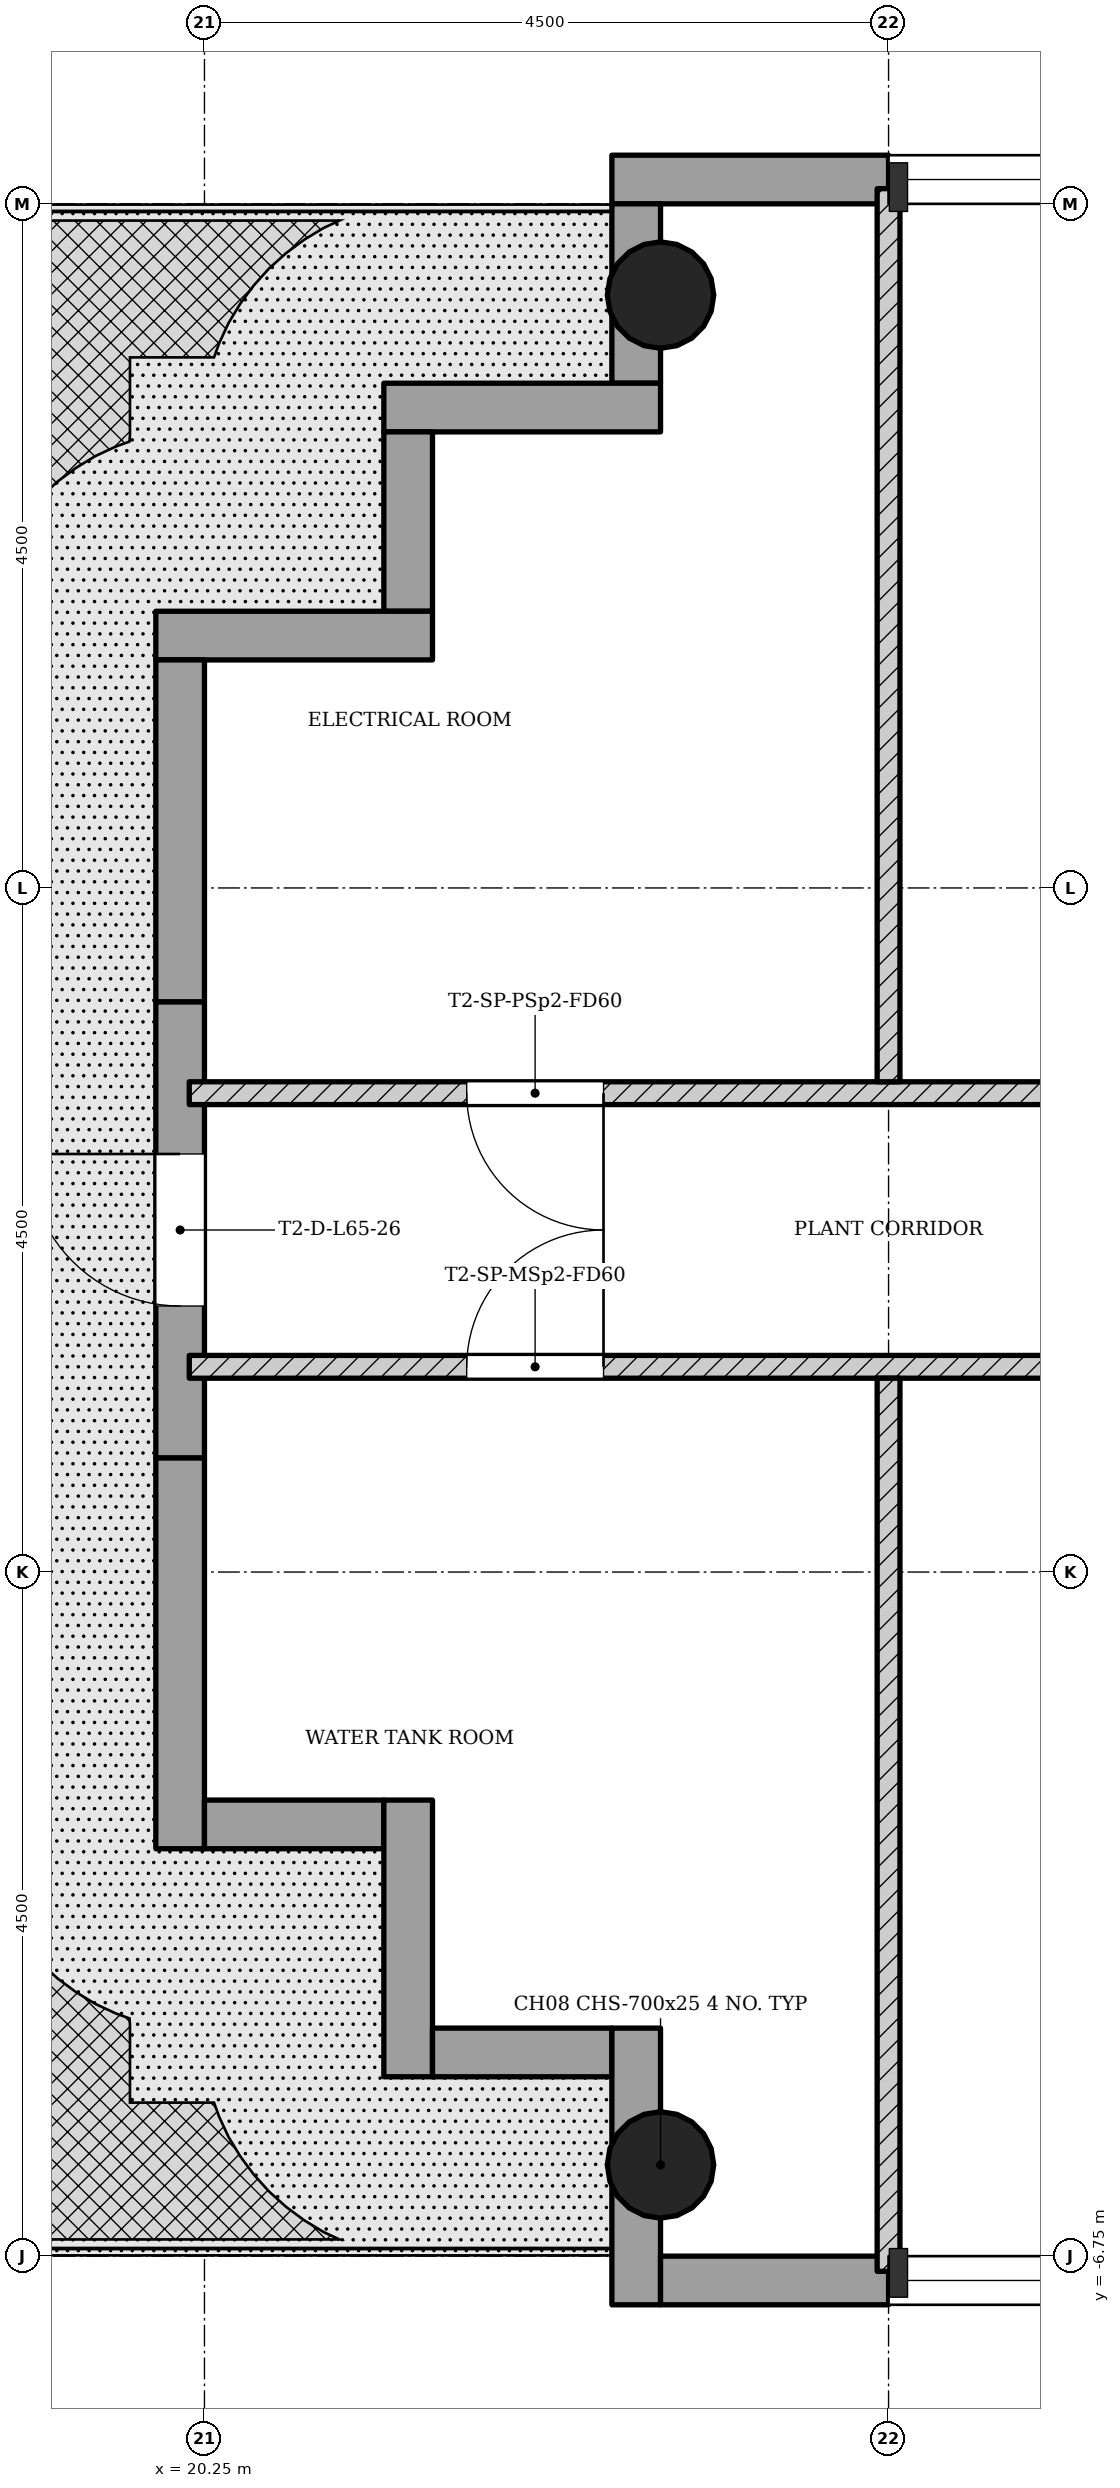
"""IFC4 building model, lengths in metres.
Left out: names, types, materials, properties, quantities, classifications, styles, units other than length and angle.
Written with IfcOpenShell. Run it as: python <this file> out.ifc"""

import sys

from ifc_helpers import new_model, si_unit, direction, frame, frame_2d, origin, origin_2d, place, context, subcontext, project, spatial, rectangle, hollow_circle, extrude, element, fill, save


model = new_model("IFC4")
c1 = context("Model", 3, precision=1e-05, world=origin(), true_north=direction((0.0, 1.0)))
c2 = subcontext(c1, "Body", "Model", "MODEL_VIEW")
j1 = project(units=[si_unit("LENGTHUNIT", "METRE"), si_unit("PLANEANGLEUNIT", "RADIAN")], contexts=[c1])
p1 = place(None, origin())
s1 = spatial("IfcSite", under=j1, at=p1, CompositionType="ELEMENT")
p2 = place(p1, origin())
s2 = spatial("IfcBuilding", under=s1, at=p2, CompositionType="ELEMENT")
p3 = place(p2, frame((0.0, 0.0, 233.4)))
s3 = spatial("IfcBuildingStorey", under=s2, at=p3, CompositionType="ELEMENT", Elevation=233.4)
for number, where, z_axis, x_axis in (
    (1, (23.25, 6.15, 0.0), (0.0, 0.0, 1.0), (1.0, 0.0, 0.0)),
    (2, (23.25, -6.15, 0.0), (0.0, 0.0, 1.0), (1.0, 0.0, 0.0)),
):
    element("IfcColumn", number, at=place(p3, frame(where, z_axis=z_axis, x_axis=x_axis)), inside=s3, PredefinedType="COLUMN", context=c2, shape_type="SweptSolid", body=[
        extrude(hollow_circle(Radius=0.35, WallThickness=0.025, at=origin_2d()), origin(), (0.0, 0.0, 1.0), 4.5),
    ])
p4 = place(p3, frame((24.75, 6.91, 0.0), z_axis=(0.0, 0.0, 1.0), x_axis=(-1.0, 0.0, 0.0)))
e3 = element("IfcWall", 3, at=p4, inside=s3, PredefinedType="STANDARD", context=c2, shape_type="SweptSolid", body=[
    extrude(rectangle(XDim=1.82, YDim=0.32, at=frame_2d((0.91, 0.0))), origin(), (0.0, 0.0, 1.0), 4.2),
])
p5 = place(p3, frame((23.09, 6.75, -0.02), z_axis=(0.0, 0.0, 1.0), x_axis=(0.0, -1.0, 0.0)))
e4 = element("IfcWall", 4, at=p5, inside=s3, PredefinedType="STANDARD", context=c2, shape_type="SweptSolid", body=[
    extrude(rectangle(XDim=1.18, YDim=0.32, at=frame_2d((0.59, 0.0))), origin(), (0.0, 0.0, 1.0), 4.22),
])
p6 = place(p3, frame((23.25, 5.41, -0.02), z_axis=(0.0, 0.0, 1.0), x_axis=(-1.0, 0.0, 0.0)))
e5 = element("IfcWall", 5, at=p6, inside=s3, PredefinedType="STANDARD", context=c2, shape_type="SweptSolid", body=[
    extrude(rectangle(XDim=1.82, YDim=0.32, at=frame_2d((0.91, 0.0))), origin(), (0.0, 0.0, 1.0), 4.22),
])
p7 = place(p3, frame((21.59, 5.25, -0.02), z_axis=(0.0, 0.0, 1.0), x_axis=(0.0, -1.0, 0.0)))
e6 = element("IfcWall", 6, at=p7, inside=s3, PredefinedType="STANDARD", context=c2, shape_type="SweptSolid", body=[
    extrude(rectangle(XDim=1.18, YDim=0.32, at=frame_2d((0.59, 0.0))), origin(), (0.0, 0.0, 1.0), 4.22),
])
p8 = place(p3, frame((21.75, 3.91, -0.02), z_axis=(0.0, 0.0, 1.0), x_axis=(-1.0, 0.0, 0.0)))
e7 = element("IfcWall", 7, at=p8, inside=s3, PredefinedType="STANDARD", context=c2, shape_type="SweptSolid", body=[
    extrude(rectangle(XDim=1.82, YDim=0.32, at=frame_2d((0.91, 0.0))), origin(), (0.0, 0.0, 1.0), 4.22),
])
p9 = place(p3, frame((20.09, 3.75, -0.02), z_axis=(0.0, 0.0, 1.0), x_axis=(0.0, -1.0, 0.0)))
e8 = element("IfcWall", 8, at=p9, inside=s3, PredefinedType="STANDARD", context=c2, shape_type="SweptSolid", body=[
    extrude(rectangle(XDim=2.25, YDim=0.32, at=frame_2d((1.125, 0.0))), origin(), (0.0, 0.0, 1.0), 4.22),
])
p10 = place(p3, frame((20.09, 1.5, -0.02), z_axis=(0.0, 0.0, 1.0), x_axis=(0.0, -1.0, 0.0)))
e9 = element("IfcWall", 9, at=p10, inside=s3, PredefinedType="STANDARD", context=c2, shape_type="SweptSolid", body=[
    extrude(rectangle(XDim=3.0, YDim=0.32, at=frame_2d((1.5, 0.0))), origin(), (0.0, 0.0, 1.0), 4.22),
])
p11 = place(p10, frame((1.0, 0.0, 0.02)))
e10 = element("IfcOpeningElement", 10, at=p11, cuts=e9, PredefinedType="OPENING", context=c2, shape_type="SweptSolid", body=[
    extrude(rectangle(XDim=1.0, YDim=2.1, at=frame_2d((0.5, 1.05))), frame((0.0, 0.17, 0.0), z_axis=(0.0, -1.0, 0.0), x_axis=(1.0, 0.0, 0.0)), (0.0, 0.0, 1.0), 0.34),
])
p12 = place(p3, frame((20.09, -1.5, -0.02), z_axis=(0.0, 0.0, 1.0), x_axis=(0.0, -1.0, 0.0)))
e11 = element("IfcWall", 11, at=p12, inside=s3, PredefinedType="STANDARD", context=c2, shape_type="SweptSolid", body=[
    extrude(rectangle(XDim=2.57, YDim=0.32, at=frame_2d((1.285, 0.0))), origin(), (0.0, 0.0, 1.0), 4.22),
])
p13 = place(p3, frame((20.25, -3.91, -0.02), z_axis=(0.0, 0.0, 1.0), x_axis=(1.0, 0.0, 0.0)))
e12 = element("IfcWall", 12, at=p13, inside=s3, PredefinedType="STANDARD", context=c2, shape_type="SweptSolid", body=[
    extrude(rectangle(XDim=1.18, YDim=0.32, at=frame_2d((0.59, 0.0))), origin(), (0.0, 0.0, 1.0), 4.22),
])
p14 = place(p3, frame((21.59, -3.75, -0.02), z_axis=(0.0, 0.0, 1.0), x_axis=(0.0, -1.0, 0.0)))
e13 = element("IfcWall", 13, at=p14, inside=s3, PredefinedType="STANDARD", context=c2, shape_type="SweptSolid", body=[
    extrude(rectangle(XDim=1.82, YDim=0.32, at=frame_2d((0.91, 0.0))), origin(), (0.0, 0.0, 1.0), 4.22),
])
p15 = place(p3, frame((21.75, -5.41, -0.02), z_axis=(0.0, 0.0, 1.0), x_axis=(1.0, 0.0, 0.0)))
e14 = element("IfcWall", 14, at=p15, inside=s3, PredefinedType="STANDARD", context=c2, shape_type="SweptSolid", body=[
    extrude(rectangle(XDim=1.18, YDim=0.32, at=frame_2d((0.59, 0.0))), origin(), (0.0, 0.0, 1.0), 4.22),
])
p16 = place(p3, frame((23.09, -5.25, -0.02), z_axis=(0.0, 0.0, 1.0), x_axis=(0.0, -1.0, 0.0)))
e15 = element("IfcWall", 15, at=p16, inside=s3, PredefinedType="STANDARD", context=c2, shape_type="SweptSolid", body=[
    extrude(rectangle(XDim=1.82, YDim=0.32, at=frame_2d((0.91, 0.0))), origin(), (0.0, 0.0, 1.0), 4.22),
])
p17 = place(p3, frame((23.25, -6.91, 0.0), z_axis=(0.0, 0.0, 1.0), x_axis=(1.0, 0.0, 0.0)))
e16 = element("IfcWall", 16, at=p17, inside=s3, PredefinedType="STANDARD", context=c2, shape_type="SweptSolid", body=[
    extrude(rectangle(XDim=1.5, YDim=0.32, at=frame_2d((0.75, 0.0))), origin(), (0.0, 0.0, 1.0), 4.2),
])
p18 = place(p3, frame((29.175, 0.9, 0.0), z_axis=(0.0, 0.0, 1.0), x_axis=(-1.0, 0.0, 0.0)))
e17 = element("IfcWall", 17, at=p18, inside=s3, PredefinedType="PARTITIONING", context=c2, shape_type="SweptSolid", body=[
    extrude(rectangle(XDim=9.025, YDim=0.15, at=frame_2d((4.513, 0.0))), origin(), (0.0, 0.0, 1.0), 4.1),
])
p19 = place(p18, frame((1.8, 0.0, 0.0)))
e18 = element("IfcOpeningElement", 18, at=p19, cuts=e17, PredefinedType="OPENING", context=c2, shape_type="SweptSolid", body=[
    extrude(rectangle(XDim=0.9, YDim=2.1, at=frame_2d((0.45, 1.05))), frame((0.0, 0.085, 0.0), z_axis=(0.0, -1.0, 0.0), x_axis=(1.0, 0.0, 0.0)), (0.0, 0.0, 1.0), 0.17),
])
p20 = place(p18, frame((6.3, 0.0, 0.0)))
e19 = element("IfcOpeningElement", 19, at=p20, cuts=e17, PredefinedType="OPENING", context=c2, shape_type="SweptSolid", body=[
    extrude(rectangle(XDim=0.9, YDim=2.1, at=frame_2d((0.45, 1.05))), frame((0.0, 0.085, 0.0), z_axis=(0.0, -1.0, 0.0), x_axis=(1.0, 0.0, 0.0)), (0.0, 0.0, 1.0), 0.17),
])
p21 = place(p3, frame((24.75, 0.975, 0.0), z_axis=(0.0, 0.0, 1.0), x_axis=(0.0, 1.0, 0.0)))
e20 = element("IfcWall", 20, at=p21, inside=s3, PredefinedType="PARTITIONING", context=c2, shape_type="SweptSolid", body=[
    extrude(rectangle(XDim=5.875, YDim=0.15, at=frame_2d((2.938, 0.0))), origin(), (0.0, 0.0, 1.0), 4.1),
])
p22 = place(p3, frame((29.175, -0.9, 0.0), z_axis=(0.0, 0.0, 1.0), x_axis=(-1.0, 0.0, 0.0)))
e21 = element("IfcWall", 21, at=p22, inside=s3, PredefinedType="PARTITIONING", context=c2, shape_type="SweptSolid", body=[
    extrude(rectangle(XDim=9.025, YDim=0.15, at=frame_2d((4.513, 0.0))), origin(), (0.0, 0.0, 1.0), 4.1),
])
p23 = place(p22, frame((1.8, 0.0, 0.0)))
e22 = element("IfcOpeningElement", 22, at=p23, cuts=e21, PredefinedType="OPENING", context=c2, shape_type="SweptSolid", body=[
    extrude(rectangle(XDim=0.9, YDim=2.1, at=frame_2d((0.45, 1.05))), frame((0.0, 0.085, 0.0), z_axis=(0.0, -1.0, 0.0), x_axis=(1.0, 0.0, 0.0)), (0.0, 0.0, 1.0), 0.17),
])
p24 = place(p22, frame((6.3, 0.0, 0.0)))
e23 = element("IfcOpeningElement", 23, at=p24, cuts=e21, PredefinedType="OPENING", context=c2, shape_type="SweptSolid", body=[
    extrude(rectangle(XDim=0.9, YDim=2.1, at=frame_2d((0.45, 1.05))), frame((0.0, 0.085, 0.0), z_axis=(0.0, -1.0, 0.0), x_axis=(1.0, 0.0, 0.0)), (0.0, 0.0, 1.0), 0.17),
])
p25 = place(p3, frame((24.75, -0.975, 0.0), z_axis=(0.0, 0.0, 1.0), x_axis=(0.0, -1.0, 0.0)))
e24 = element("IfcWall", 24, at=p25, inside=s3, PredefinedType="PARTITIONING", context=c2, shape_type="SweptSolid", body=[
    extrude(rectangle(XDim=5.875, YDim=0.15, at=frame_2d((2.938, 0.0))), origin(), (0.0, 0.0, 1.0), 4.1),
])
p26 = place(p11, origin())
e25 = element("IfcDoor", 25, at=p26, inside=s3, OperationType="SINGLE_SWING_LEFT", PredefinedType="DOOR", context=c2, shape_type="SweptSolid", body=[
    extrude(rectangle(XDim=1.0, YDim=2.1, at=frame_2d((0.5, 1.05))), frame((0.0, 0.025, 0.0), z_axis=(0.0, -1.0, 0.0), x_axis=(1.0, 0.0, 0.0)), (0.0, 0.0, 1.0), 0.05),
])
fill(e10, e25)
p27 = place(p20, origin())
e26 = element("IfcDoor", 26, at=p27, inside=s3, OperationType="SINGLE_SWING_RIGHT", PredefinedType="DOOR", context=c2, shape_type="SweptSolid", body=[
    extrude(rectangle(XDim=0.9, YDim=2.1, at=frame_2d((0.45, 1.05))), frame((0.0, 0.025, 0.0), z_axis=(0.0, -1.0, 0.0), x_axis=(1.0, 0.0, 0.0)), (0.0, 0.0, 1.0), 0.05),
])
fill(e19, e26)
p28 = place(p24, origin())
e27 = element("IfcDoor", 27, at=p28, inside=s3, OperationType="SINGLE_SWING_LEFT", PredefinedType="DOOR", context=c2, shape_type="SweptSolid", body=[
    extrude(rectangle(XDim=0.9, YDim=2.1, at=frame_2d((0.45, 1.05))), frame((0.0, 0.025, 0.0), z_axis=(0.0, -1.0, 0.0), x_axis=(1.0, 0.0, 0.0)), (0.0, 0.0, 1.0), 0.05),
])
fill(e23, e27)
save(model, sys.argv[1])
